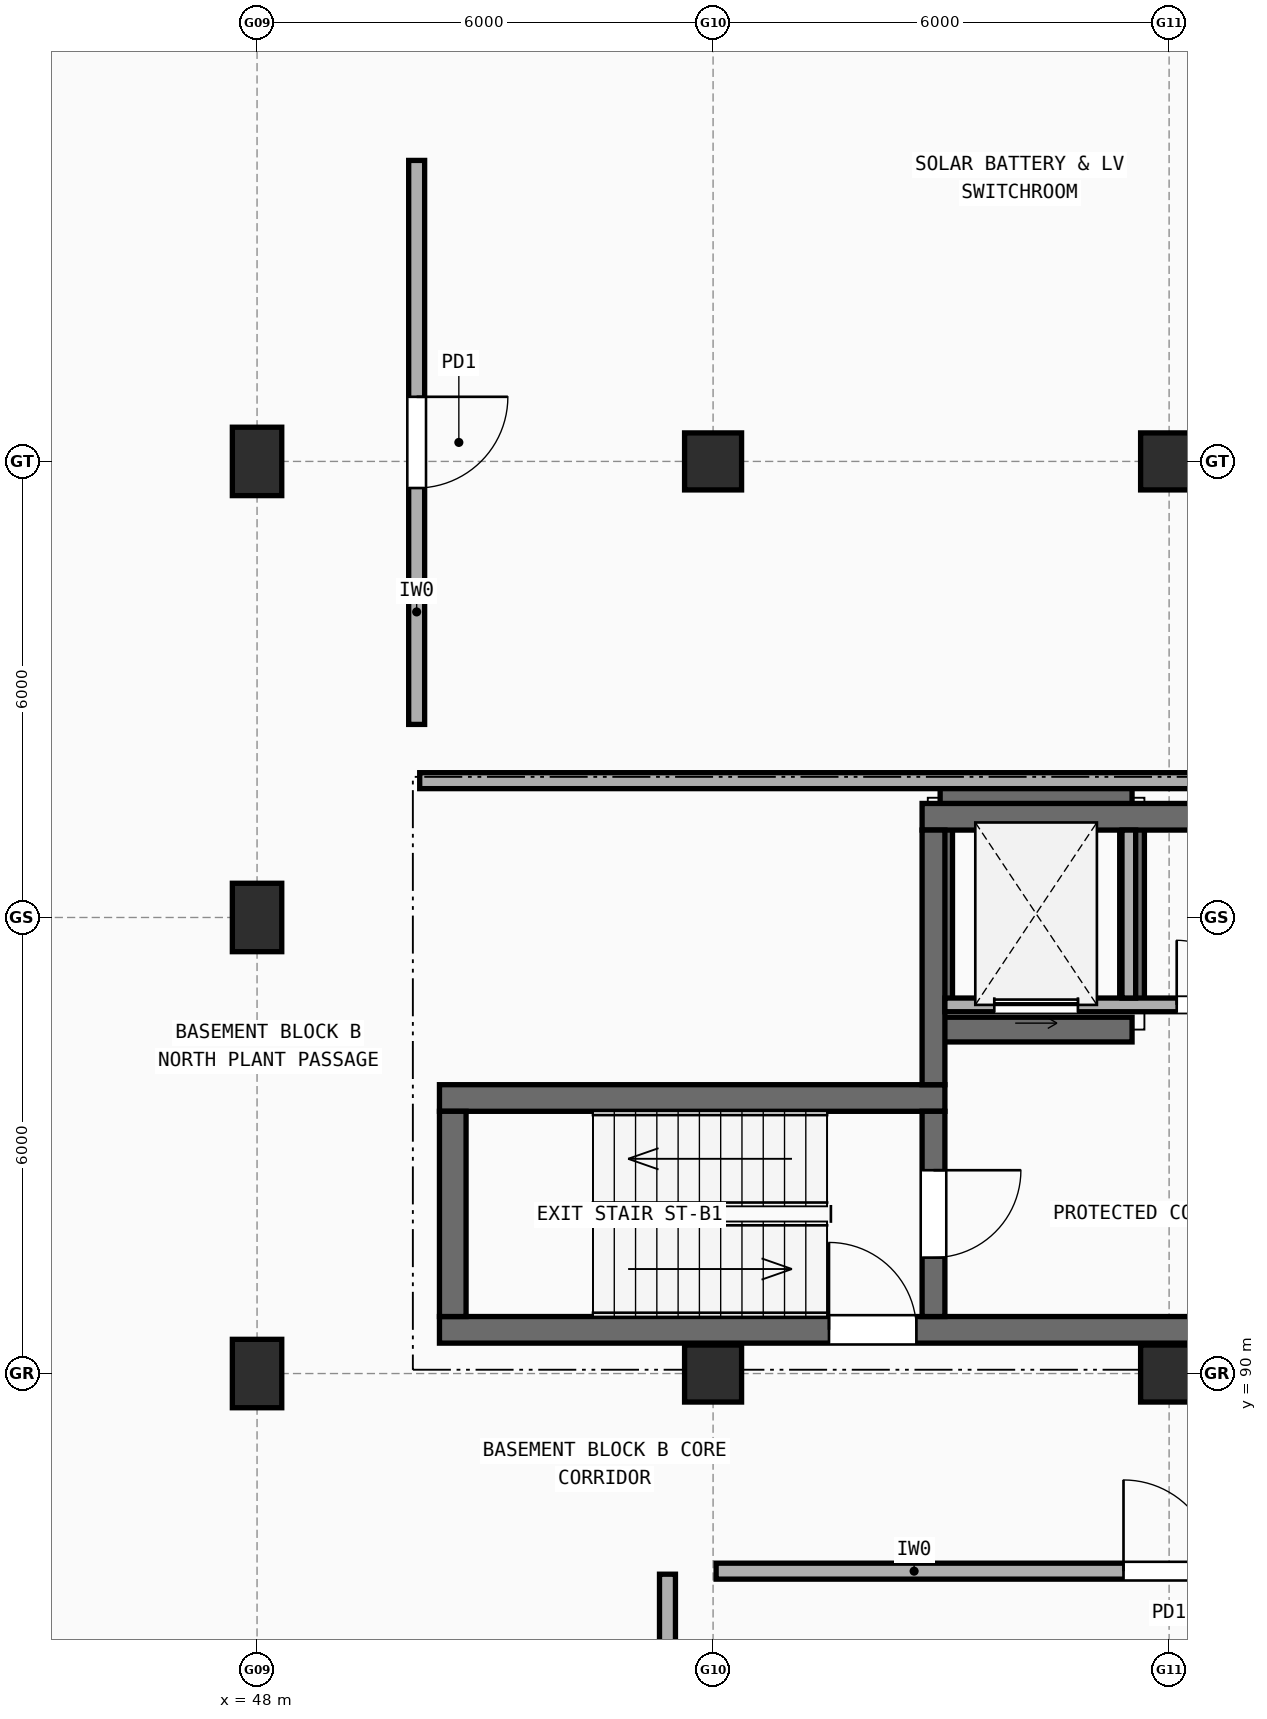
"""IFC4 building model, lengths in metres.
Left out: names, types, materials, properties, quantities, classifications, styles, units other than length and angle.
Written with IfcOpenShell. Run it as: python <this file> out.ifc"""

import sys

from ifc_helpers import new_model, si_unit, direction, frame, frame_2d, origin, origin_2d, place, context, subcontext, project, spatial, rectangle, extrude, element, fill, save


model = new_model("IFC4")
c1 = context("Model", 3, precision=1e-05, world=origin(), true_north=direction((0.0, 1.0)))
c2 = subcontext(c1, "Body", "Model", "MODEL_VIEW")
j1 = project(units=[si_unit("LENGTHUNIT", "METRE"), si_unit("PLANEANGLEUNIT", "RADIAN")], contexts=[c1])
p1 = place(None, origin())
s1 = spatial("IfcSite", under=j1, at=p1, CompositionType="ELEMENT")
p2 = place(p1, origin())
s2 = spatial("IfcBuilding", under=s1, at=p2, CompositionType="ELEMENT")
p3 = place(p2, frame((0.0, 0.0, -4.5)))
s3 = spatial("IfcBuildingStorey", under=s2, at=p3, CompositionType="ELEMENT", Elevation=-4.5)
p4 = place(p3, frame((56.988, 94.525, -1.1), z_axis=(0.0, 0.0, 1.0), x_axis=(1.0, 0.0, 0.0)))
e1 = element("IfcWall", 1, at=p4, inside=s3, PredefinedType="SHEAR", context=c2, shape_type="SweptSolid", body=[
    extrude(rectangle(XDim=2.525, YDim=0.325, at=frame_2d((1.262, 0.0))), origin(), (0.0, 0.0, 1.0), 1.1),
])
p5 = place(p3, frame((59.512, 94.85, -1.1), z_axis=(0.0, 0.0, 1.0), x_axis=(0.0, 1.0, 0.0)))
e2 = element("IfcWall", 2, at=p5, inside=s3, PredefinedType="SHEAR", context=c2, shape_type="SweptSolid", body=[
    extrude(rectangle(XDim=2.4, YDim=0.325, at=frame_2d((1.2, 0.0))), origin(), (0.0, 0.0, 1.0), 1.1),
])
p6 = place(p3, frame((59.512, 97.575, -1.1), z_axis=(0.0, 0.0, 1.0), x_axis=(-1.0, 0.0, 0.0)))
e3 = element("IfcWall", 3, at=p6, inside=s3, PredefinedType="SHEAR", context=c2, shape_type="SweptSolid", body=[
    extrude(rectangle(XDim=2.525, YDim=0.325, at=frame_2d((1.262, 0.0))), origin(), (0.0, 0.0, 1.0), 1.1),
])
p7 = place(p3, frame((56.988, 97.25, -1.1), z_axis=(0.0, 0.0, 1.0), x_axis=(0.0, -1.0, 0.0)))
e4 = element("IfcWall", 4, at=p7, inside=s3, PredefinedType="SHEAR", context=c2, shape_type="SweptSolid", body=[
    extrude(rectangle(XDim=2.4, YDim=0.325, at=frame_2d((1.2, 0.0))), origin(), (0.0, 0.0, 1.0), 1.1),
])
for number, where, z_axis, x_axis in (
    (5, (48.0, 90.0, 0.0), (0.0, 0.0, 1.0), (1.0, 0.0, 0.0)),
    (6, (48.0, 96.0, 0.0), (0.0, 0.0, 1.0), (1.0, 0.0, 0.0)),
    (7, (48.0, 102.0, 0.0), (0.0, 0.0, 1.0), (1.0, 0.0, 0.0)),
):
    element("IfcColumn", number, at=place(p3, frame(where, z_axis=z_axis, x_axis=x_axis)), inside=s3, PredefinedType="COLUMN", context=c2, shape_type="SweptSolid", body=[
        extrude(rectangle(XDim=0.65, YDim=0.9, at=origin_2d()), origin(), (0.0, 0.0, 1.0), 4.215),
    ])
for number, where, z_axis, x_axis in (
    (8, (54.0, 90.0, 0.0), (0.0, 0.0, 1.0), (1.0, 0.0, 0.0)),
    (9, (54.0, 102.0, 0.0), (0.0, 0.0, 1.0), (1.0, 0.0, 0.0)),
    (10, (60.0, 90.0, 0.0), (0.0, 0.0, 1.0), (1.0, 0.0, 0.0)),
    (11, (60.0, 102.0, 0.0), (0.0, 0.0, 1.0), (1.0, 0.0, 0.0)),
):
    element("IfcColumn", number, at=place(p3, frame(where, z_axis=z_axis, x_axis=x_axis)), inside=s3, PredefinedType="COLUMN", context=c2, shape_type="SweptSolid", body=[
        extrude(rectangle(XDim=0.75, YDim=0.75, at=origin_2d()), origin(), (0.0, 0.0, 1.0), 4.215),
    ])
p8 = place(p3, frame((50.4, 90.575, 0.0), z_axis=(0.0, 0.0, 1.0), x_axis=(1.0, 0.0, 0.0)))
e12 = element("IfcWall", 12, at=p8, inside=s3, PredefinedType="SHEAR", context=c2, shape_type="SweptSolid", body=[
    extrude(rectangle(XDim=11.4, YDim=0.35, at=frame_2d((5.7, 0.0))), origin(), (0.0, 0.0, 1.0), 4.215),
])
p9 = place(p8, frame((5.125, 0.0, 0.0)))
e13 = element("IfcOpeningElement", 13, at=p9, cuts=e12, PredefinedType="OPENING", context=c2, shape_type="SweptSolid", body=[
    extrude(rectangle(XDim=1.15, YDim=2.15, at=frame_2d((0.575, 1.075))), frame((0.0, 0.185, 0.0), z_axis=(0.0, -1.0, 0.0), x_axis=(1.0, 0.0, 0.0)), (0.0, 0.0, 1.0), 0.37),
])
p10 = place(p3, frame((57.05, 93.625, 0.0), z_axis=(0.0, 0.0, 1.0), x_axis=(-1.0, 0.0, 0.0)))
e14 = element("IfcWall", 14, at=p10, inside=s3, PredefinedType="SHEAR", context=c2, shape_type="SweptSolid", body=[
    extrude(rectangle(XDim=6.65, YDim=0.35, at=frame_2d((3.325, 0.0))), origin(), (0.0, 0.0, 1.0), 4.215),
])
p11 = place(p3, frame((50.575, 93.45, 0.0), z_axis=(0.0, 0.0, 1.0), x_axis=(0.0, -1.0, 0.0)))
e15 = element("IfcWall", 15, at=p11, inside=s3, PredefinedType="SHEAR", context=c2, shape_type="SweptSolid", body=[
    extrude(rectangle(XDim=2.7, YDim=0.35, at=frame_2d((1.35, 0.0))), origin(), (0.0, 0.0, 1.0), 4.215),
])
p12 = place(p3, frame((56.9, 90.75, 0.0), z_axis=(0.0, 0.0, 1.0), x_axis=(0.0, 1.0, 0.0)))
e16 = element("IfcWall", 16, at=p12, inside=s3, PredefinedType="SHEAR", context=c2, shape_type="SweptSolid", body=[
    extrude(rectangle(XDim=2.7, YDim=0.3, at=frame_2d((1.35, 0.0))), origin(), (0.0, 0.0, 1.0), 4.215),
])
p13 = place(p12, frame((0.775, 0.0, 0.0)))
e17 = element("IfcOpeningElement", 17, at=p13, cuts=e16, PredefinedType="OPENING", context=c2, shape_type="SweptSolid", body=[
    extrude(rectangle(XDim=1.15, YDim=2.15, at=frame_2d((0.575, 1.075))), frame((0.0, 0.16, 0.0), z_axis=(0.0, -1.0, 0.0), x_axis=(1.0, 0.0, 0.0)), (0.0, 0.0, 1.0), 0.32),
])
p14 = place(p3, frame((61.8, 97.325, 0.0), z_axis=(0.0, 0.0, 1.0), x_axis=(-1.0, 0.0, 0.0)))
e18 = element("IfcWall", 18, at=p14, inside=s3, PredefinedType="SHEAR", context=c2, shape_type="SweptSolid", body=[
    extrude(rectangle(XDim=5.05, YDim=0.35, at=frame_2d((2.525, 0.0))), origin(), (0.0, 0.0, 1.0), 4.215),
])
p15 = place(p3, frame((56.9, 93.8, 0.0), z_axis=(0.0, 0.0, 1.0), x_axis=(0.0, 1.0, 0.0)))
e19 = element("IfcWall", 19, at=p15, inside=s3, PredefinedType="SHEAR", context=c2, shape_type="SweptSolid", body=[
    extrude(rectangle(XDim=3.35, YDim=0.3, at=frame_2d((1.675, 0.0))), origin(), (0.0, 0.0, 1.0), 4.215),
])
p16 = place(p3, frame((57.05, 94.85, 0.0), z_axis=(0.0, 0.0, 1.0), x_axis=(1.0, 0.0, 0.0)))
e20 = element("IfcWall", 20, at=p16, inside=s3, PredefinedType="SOLIDWALL", context=c2, shape_type="SweptSolid", body=[
    extrude(rectangle(XDim=4.4, YDim=0.18, at=frame_2d((2.2, 0.0))), origin(), (0.0, 0.0, 1.0), 4.215),
])
p17 = place(p16, frame((0.65, 0.0, 0.0)))
e21 = element("IfcOpeningElement", 21, at=p17, cuts=e20, PredefinedType="OPENING", context=c2, shape_type="SweptSolid", body=[
    extrude(rectangle(XDim=1.1, YDim=2.15, at=frame_2d((0.55, 1.075))), frame((0.0, 0.1, 0.0), z_axis=(0.0, -1.0, 0.0), x_axis=(1.0, 0.0, 0.0)), (0.0, 0.0, 1.0), 0.2),
])
p18 = place(p16, frame((3.05, 0.0, 0.0)))
e22 = element("IfcOpeningElement", 22, at=p18, cuts=e20, PredefinedType="OPENING", context=c2, shape_type="SweptSolid", body=[
    extrude(rectangle(XDim=0.85, YDim=2.1, at=frame_2d((0.425, 1.05))), frame((0.0, 0.1, 0.0), z_axis=(0.0, -1.0, 0.0), x_axis=(1.0, 0.0, 0.0)), (0.0, 0.0, 1.0), 0.2),
])
p19 = place(p3, frame((59.47, 94.94, 0.0), z_axis=(0.0, 0.0, 1.0), x_axis=(0.0, 1.0, 0.0)))
e23 = element("IfcWall", 23, at=p19, inside=s3, PredefinedType="SOLIDWALL", context=c2, shape_type="SweptSolid", body=[
    extrude(rectangle(XDim=2.21, YDim=0.18, at=frame_2d((1.105, 0.0))), origin(), (0.0, 0.0, 1.0), 4.215),
])
p20 = place(p3, frame((54.04, 87.4, 0.0), z_axis=(0.0, 0.0, 1.0), x_axis=(1.0, 0.0, 0.0)))
e24 = element("IfcWall", 24, at=p20, inside=s3, PredefinedType="SOLIDWALL", context=c2, shape_type="SweptSolid", body=[
    extrude(rectangle(XDim=11.92, YDim=0.21, at=frame_2d((5.96, 0.0))), origin(), (0.0, 0.0, 1.0), 3.497),
])
p21 = place(p20, frame((5.36, 0.0, 0.0)))
e25 = element("IfcOpeningElement", 25, at=p21, cuts=e24, PredefinedType="OPENING", context=c2, shape_type="SweptSolid", body=[
    extrude(rectangle(XDim=1.2, YDim=2.15, at=frame_2d((0.6, 1.075))), frame((0.0, 0.115, 0.0), z_axis=(0.0, -1.0, 0.0), x_axis=(1.0, 0.0, 0.0)), (0.0, 0.0, 1.0), 0.23),
])
p22 = place(p3, frame((53.4, 87.36, 0.0), z_axis=(0.0, 0.0, 1.0), x_axis=(0.0, -1.0, 0.0)))
e26 = element("IfcWall", 26, at=p22, inside=s3, PredefinedType="SOLIDWALL", context=c2, shape_type="SweptSolid", body=[
    extrude(rectangle(XDim=15.32, YDim=0.21, at=frame_2d((7.66, 0.0))), origin(), (0.0, 0.0, 1.0), 3.447),
])
p23 = place(p3, frame((50.1, 98.54, 0.0), z_axis=(0.0, 0.0, 1.0), x_axis=(0.0, 1.0, 0.0)))
e27 = element("IfcWall", 27, at=p23, inside=s3, PredefinedType="SOLIDWALL", context=c2, shape_type="SweptSolid", body=[
    extrude(rectangle(XDim=7.42, YDim=0.21, at=frame_2d((3.71, 0.0))), origin(), (0.0, 0.0, 1.0), 3.547),
])
p24 = place(p23, frame((3.11, 0.0, 0.0)))
e28 = element("IfcOpeningElement", 28, at=p24, cuts=e27, PredefinedType="OPENING", context=c2, shape_type="SweptSolid", body=[
    extrude(rectangle(XDim=1.2, YDim=2.15, at=frame_2d((0.6, 1.075))), frame((0.0, 0.115, 0.0), z_axis=(0.0, -1.0, 0.0), x_axis=(1.0, 0.0, 0.0)), (0.0, 0.0, 1.0), 0.23),
])
p25 = place(p3, frame((50.14, 97.8, 0.0), z_axis=(0.0, 0.0, 1.0), x_axis=(1.0, 0.0, 0.0)))
e29 = element("IfcWall", 29, at=p25, inside=s3, PredefinedType="SOLIDWALL", context=c2, shape_type="SweptSolid", body=[
    extrude(rectangle(XDim=32.32, YDim=0.21, at=frame_2d((16.16, 0.0))), origin(), (0.0, 0.0, 1.0), 2.897),
])
p26 = place(p9, origin())
e30 = element("IfcDoor", 30, at=p26, inside=s3, OperationType="SINGLE_SWING_LEFT", PredefinedType="DOOR", context=c2, shape_type="SweptSolid", body=[
    extrude(rectangle(XDim=1.15, YDim=2.15, at=frame_2d((0.575, 1.075))), frame((0.0, 0.025, 0.0), z_axis=(0.0, -1.0, 0.0), x_axis=(1.0, 0.0, 0.0)), (0.0, 0.0, 1.0), 0.05),
])
fill(e13, e30)
p27 = place(p13, origin())
e31 = element("IfcDoor", 31, at=p27, inside=s3, OperationType="SINGLE_SWING_RIGHT", PredefinedType="DOOR", context=c2, shape_type="SweptSolid", body=[
    extrude(rectangle(XDim=1.15, YDim=2.15, at=frame_2d((0.575, 1.075))), frame((0.0, 0.025, 0.0), z_axis=(0.0, -1.0, 0.0), x_axis=(1.0, 0.0, 0.0)), (0.0, 0.0, 1.0), 0.05),
])
fill(e17, e31)
p28 = place(p17, origin())
e32 = element("IfcDoor", 32, at=p28, inside=s3, OperationType="SLIDING_TO_LEFT", PredefinedType="DOOR", context=c2, shape_type="SweptSolid", body=[
    extrude(rectangle(XDim=1.1, YDim=2.15, at=frame_2d((0.55, 1.075))), frame((0.0, 0.025, 0.0), z_axis=(0.0, -1.0, 0.0), x_axis=(1.0, 0.0, 0.0)), (0.0, 0.0, 1.0), 0.05),
])
fill(e21, e32)
p29 = place(p18, frame((0.85, 0.0, 0.0), z_axis=(0.0, 0.0, 1.0), x_axis=(-1.0, 0.0, 0.0)))
e33 = element("IfcDoor", 33, at=p29, inside=s3, OperationType="SINGLE_SWING_LEFT", PredefinedType="DOOR", context=c2, shape_type="SweptSolid", body=[
    extrude(rectangle(XDim=0.85, YDim=2.1, at=frame_2d((0.425, 1.05))), frame((0.0, 0.025, 0.0), z_axis=(0.0, -1.0, 0.0), x_axis=(1.0, 0.0, 0.0)), (0.0, 0.0, 1.0), 0.05),
])
fill(e22, e33)
p30 = place(p21, origin())
e34 = element("IfcDoor", 34, at=p30, inside=s3, OperationType="SINGLE_SWING_LEFT", PredefinedType="DOOR", context=c2, shape_type="SweptSolid", body=[
    extrude(rectangle(XDim=1.2, YDim=2.15, at=frame_2d((0.6, 1.075))), frame((0.0, 0.025, 0.0), z_axis=(0.0, -1.0, 0.0), x_axis=(1.0, 0.0, 0.0)), (0.0, 0.0, 1.0), 0.05),
])
fill(e25, e34)
p31 = place(p24, origin())
e35 = element("IfcDoor", 35, at=p31, inside=s3, OperationType="SINGLE_SWING_RIGHT", PredefinedType="DOOR", context=c2, shape_type="SweptSolid", body=[
    extrude(rectangle(XDim=1.2, YDim=2.15, at=frame_2d((0.6, 1.075))), frame((0.0, 0.025, 0.0), z_axis=(0.0, -1.0, 0.0), x_axis=(1.0, 0.0, 0.0)), (0.0, 0.0, 1.0), 0.05),
])
fill(e28, e35)
save(model, sys.argv[1])
